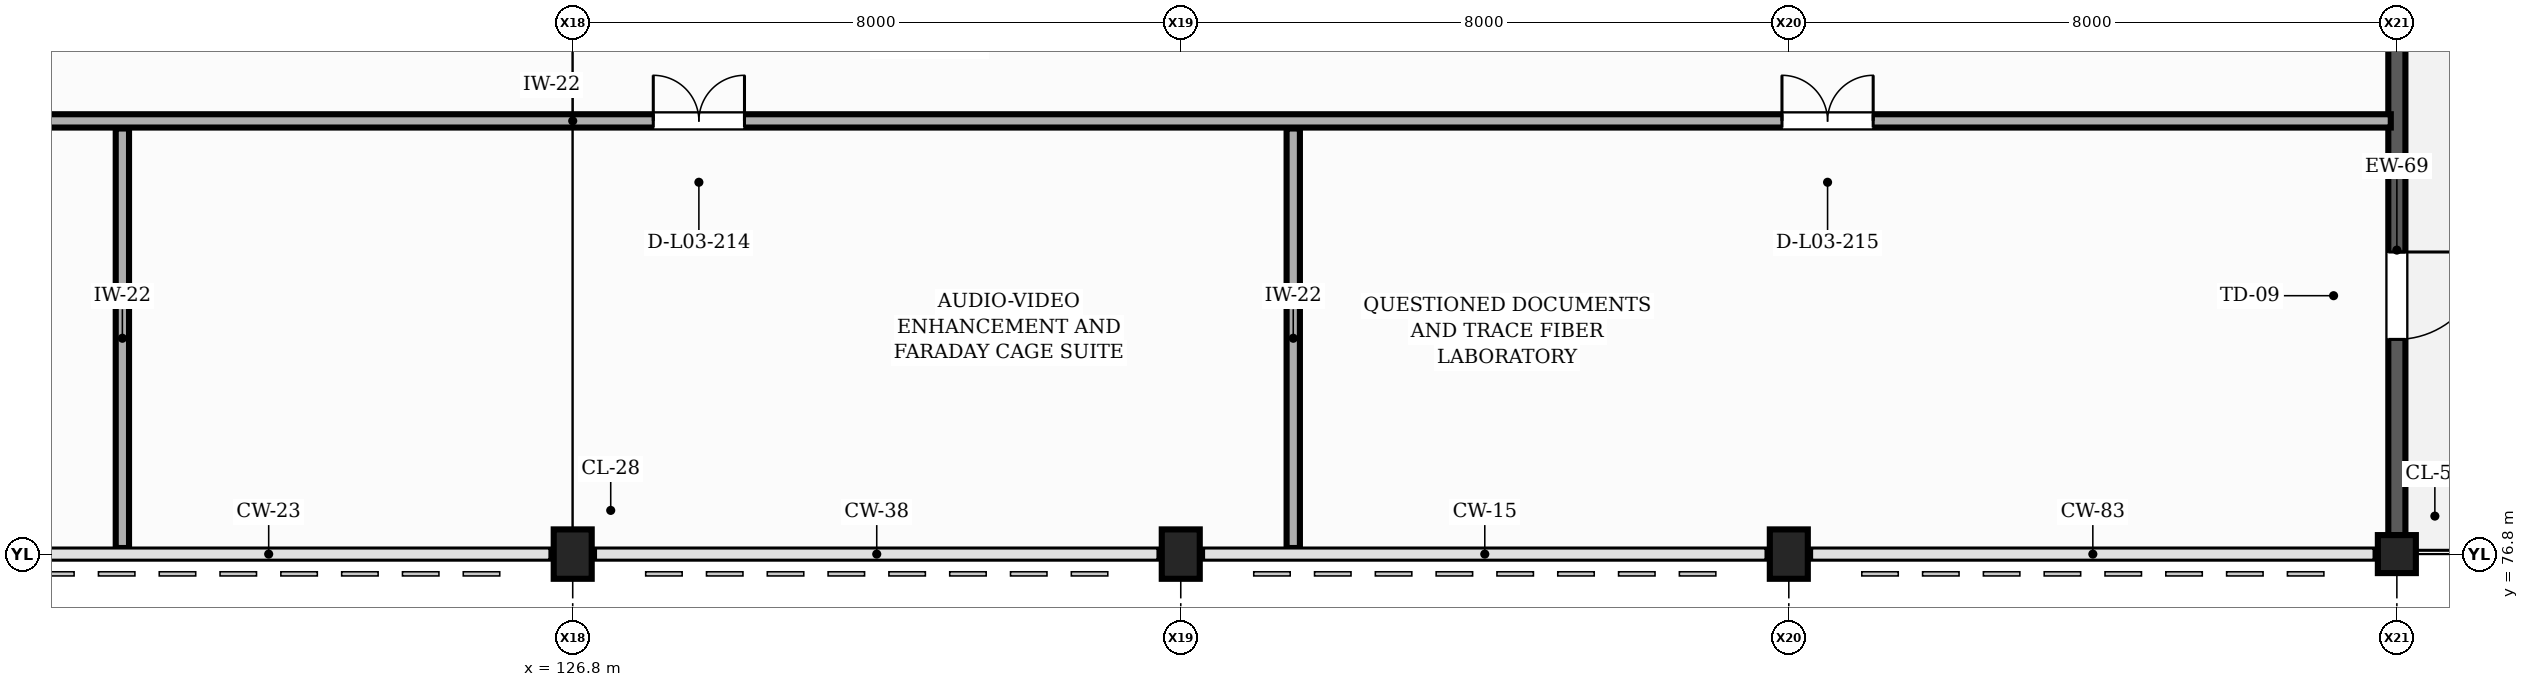
"""IFC4 building model, lengths in metres.
Left out: names, types, materials, properties, quantities, classifications, styles, units other than length and angle.
Written with IfcOpenShell. Run it as: python <this file> out.ifc"""

import sys

from ifc_helpers import new_model, si_unit, direction, frame, frame_2d, origin, origin_2d, place, context, subcontext, project, spatial, rectangle, extrude, element, fill, save


model = new_model("IFC4")
c1 = context("Model", 3, precision=1e-05, world=origin(), true_north=direction((0.0, 1.0)))
c2 = subcontext(c1, "Body", "Model", "MODEL_VIEW")
j1 = project(units=[si_unit("LENGTHUNIT", "METRE"), si_unit("PLANEANGLEUNIT", "RADIAN")], contexts=[c1])
p1 = place(None, origin())
s1 = spatial("IfcSite", under=j1, at=p1, CompositionType="ELEMENT")
p2 = place(p1, origin())
s2 = spatial("IfcBuilding", under=s1, at=p2, CompositionType="ELEMENT")
p3 = place(p2, frame((0.0, 0.0, 13.5)))
s3 = spatial("IfcBuildingStorey", under=s2, at=p3, CompositionType="ELEMENT", Elevation=13.5)
for number, where, z_axis, x_axis in (
    (1, (126.8, 76.8, 0.0), (0.0, 0.0, 1.0), (1.0, 0.0, 0.0)),
    (2, (134.8, 76.8, 0.0), (0.0, 0.0, 1.0), (1.0, 0.0, 0.0)),
    (3, (142.8, 76.8, 0.0), (0.0, 0.0, 1.0), (1.0, 0.0, 0.0)),
):
    element("IfcColumn", number, at=place(p3, frame(where, z_axis=z_axis, x_axis=x_axis)), inside=s3, PredefinedType="COLUMN", context=c2, shape_type="SweptSolid", body=[
        extrude(rectangle(XDim=0.5, YDim=0.65, at=origin_2d()), origin(), (0.0, 0.0, 1.0), 4.5),
    ])
p4 = place(p3, frame((150.8, 76.8, 0.0), z_axis=(0.0, 0.0, 1.0), x_axis=(1.0, 0.0, 0.0)))
e4 = element("IfcColumn", 4, at=p4, inside=s3, PredefinedType="COLUMN", context=c2, shape_type="SweptSolid", body=[
    extrude(rectangle(XDim=0.5, YDim=0.5, at=origin_2d()), origin(), (0.0, 0.0, 1.0), 4.5),
])
p5 = place(p3, frame((150.8, 77.05, 0.0), z_axis=(0.0, 0.0, 1.0), x_axis=(0.0, 1.0, 0.0)))
e5 = element("IfcWall", 5, at=p5, inside=s3, PredefinedType="SOLIDWALL", context=c2, shape_type="SweptSolid", body=[
    extrude(rectangle(XDim=7.5, YDim=0.225, at=frame_2d((3.75, 0.0))), origin(), (0.0, 0.0, 1.0), 3.54),
])
p6 = place(p5, frame((2.575, 0.0, 0.0)))
e6 = element("IfcOpeningElement", 6, at=p6, cuts=e5, PredefinedType="OPENING", context=c2, shape_type="SweptSolid", body=[
    extrude(rectangle(XDim=1.15, YDim=2.15, at=frame_2d((0.575, 1.075))), frame((0.0, 0.123, 0.0), z_axis=(0.0, -1.0, 0.0), x_axis=(1.0, 0.0, 0.0)), (0.0, 0.0, 1.0), 0.245),
])
for number, where, z_axis, x_axis in (
    (7, (120.875, 76.88, 0.0), (0.0, 0.0, 1.0), (0.0, 1.0, 0.0)),
    (8, (136.28, 76.88, 0.0), (0.0, 0.0, 1.0), (0.0, 1.0, 0.0)),
):
    element("IfcWall", number, at=place(p3, frame(where, z_axis=z_axis, x_axis=x_axis)), inside=s3, PredefinedType="PARTITIONING", context=c2, shape_type="SweptSolid", body=[
        extrude(rectangle(XDim=5.52, YDim=0.175, at=frame_2d((2.76, 0.0))), origin(), (0.0, 0.0, 1.0), 3.525),
    ])
p7 = place(p3, frame((102.88, 82.5, 0.0), z_axis=(0.0, 0.0, 1.0), x_axis=(1.0, 0.0, 0.0)))
e9 = element("IfcWall", 9, at=p7, inside=s3, PredefinedType="PARTITIONING", context=c2, shape_type="SweptSolid", body=[
    extrude(rectangle(XDim=47.84, YDim=0.175, at=frame_2d((23.92, 0.0))), origin(), (0.0, 0.0, 1.0), 3.525),
])
p8 = place(p7, frame((8.35, 0.0, 0.0)))
e10 = element("IfcOpeningElement", 10, at=p8, cuts=e9, PredefinedType="OPENING", context=c2, shape_type="SweptSolid", body=[
    extrude(rectangle(XDim=1.2, YDim=2.2, at=frame_2d((0.6, 1.1))), frame((0.0, 0.098, 0.0), z_axis=(0.0, -1.0, 0.0), x_axis=(1.0, 0.0, 0.0)), (0.0, 0.0, 1.0), 0.195),
])
p9 = place(p7, frame((24.98, 0.0, 0.0)))
e11 = element("IfcOpeningElement", 11, at=p9, cuts=e9, PredefinedType="OPENING", context=c2, shape_type="SweptSolid", body=[
    extrude(rectangle(XDim=1.2, YDim=2.2, at=frame_2d((0.6, 1.1))), frame((0.0, 0.098, 0.0), z_axis=(0.0, -1.0, 0.0), x_axis=(1.0, 0.0, 0.0)), (0.0, 0.0, 1.0), 0.195),
])
p10 = place(p7, frame((39.83, 0.0, 0.0)))
e12 = element("IfcOpeningElement", 12, at=p10, cuts=e9, PredefinedType="OPENING", context=c2, shape_type="SweptSolid", body=[
    extrude(rectangle(XDim=1.2, YDim=2.2, at=frame_2d((0.6, 1.1))), frame((0.0, 0.098, 0.0), z_axis=(0.0, -1.0, 0.0), x_axis=(1.0, 0.0, 0.0)), (0.0, 0.0, 1.0), 0.195),
])
p11 = place(p6, frame((1.15, 0.0, 0.0), z_axis=(0.0, 0.0, 1.0), x_axis=(-1.0, 0.0, 0.0)))
e13 = element("IfcDoor", 13, at=p11, inside=s3, OperationType="SINGLE_SWING_LEFT", PredefinedType="DOOR", context=c2, shape_type="SweptSolid", body=[
    extrude(rectangle(XDim=1.15, YDim=2.15, at=frame_2d((0.575, 1.075))), frame((0.0, 0.025, 0.0), z_axis=(0.0, -1.0, 0.0), x_axis=(1.0, 0.0, 0.0)), (0.0, 0.0, 1.0), 0.05),
])
fill(e6, e13)
p12 = place(p9, origin())
e14 = element("IfcDoor", 14, at=p12, inside=s3, OperationType="DOUBLE_DOOR_SINGLE_SWING", PredefinedType="DOOR", context=c2, shape_type="SweptSolid", body=[
    extrude(rectangle(XDim=1.2, YDim=2.2, at=frame_2d((0.6, 1.1))), frame((0.0, 0.025, 0.0), z_axis=(0.0, -1.0, 0.0), x_axis=(1.0, 0.0, 0.0)), (0.0, 0.0, 1.0), 0.05),
])
fill(e11, e14)
p13 = place(p10, origin())
e15 = element("IfcDoor", 15, at=p13, inside=s3, OperationType="DOUBLE_DOOR_SINGLE_SWING", PredefinedType="DOOR", context=c2, shape_type="SweptSolid", body=[
    extrude(rectangle(XDim=1.2, YDim=2.2, at=frame_2d((0.6, 1.1))), frame((0.0, 0.025, 0.0), z_axis=(0.0, -1.0, 0.0), x_axis=(1.0, 0.0, 0.0)), (0.0, 0.0, 1.0), 0.05),
])
fill(e12, e15)
save(model, sys.argv[1])
